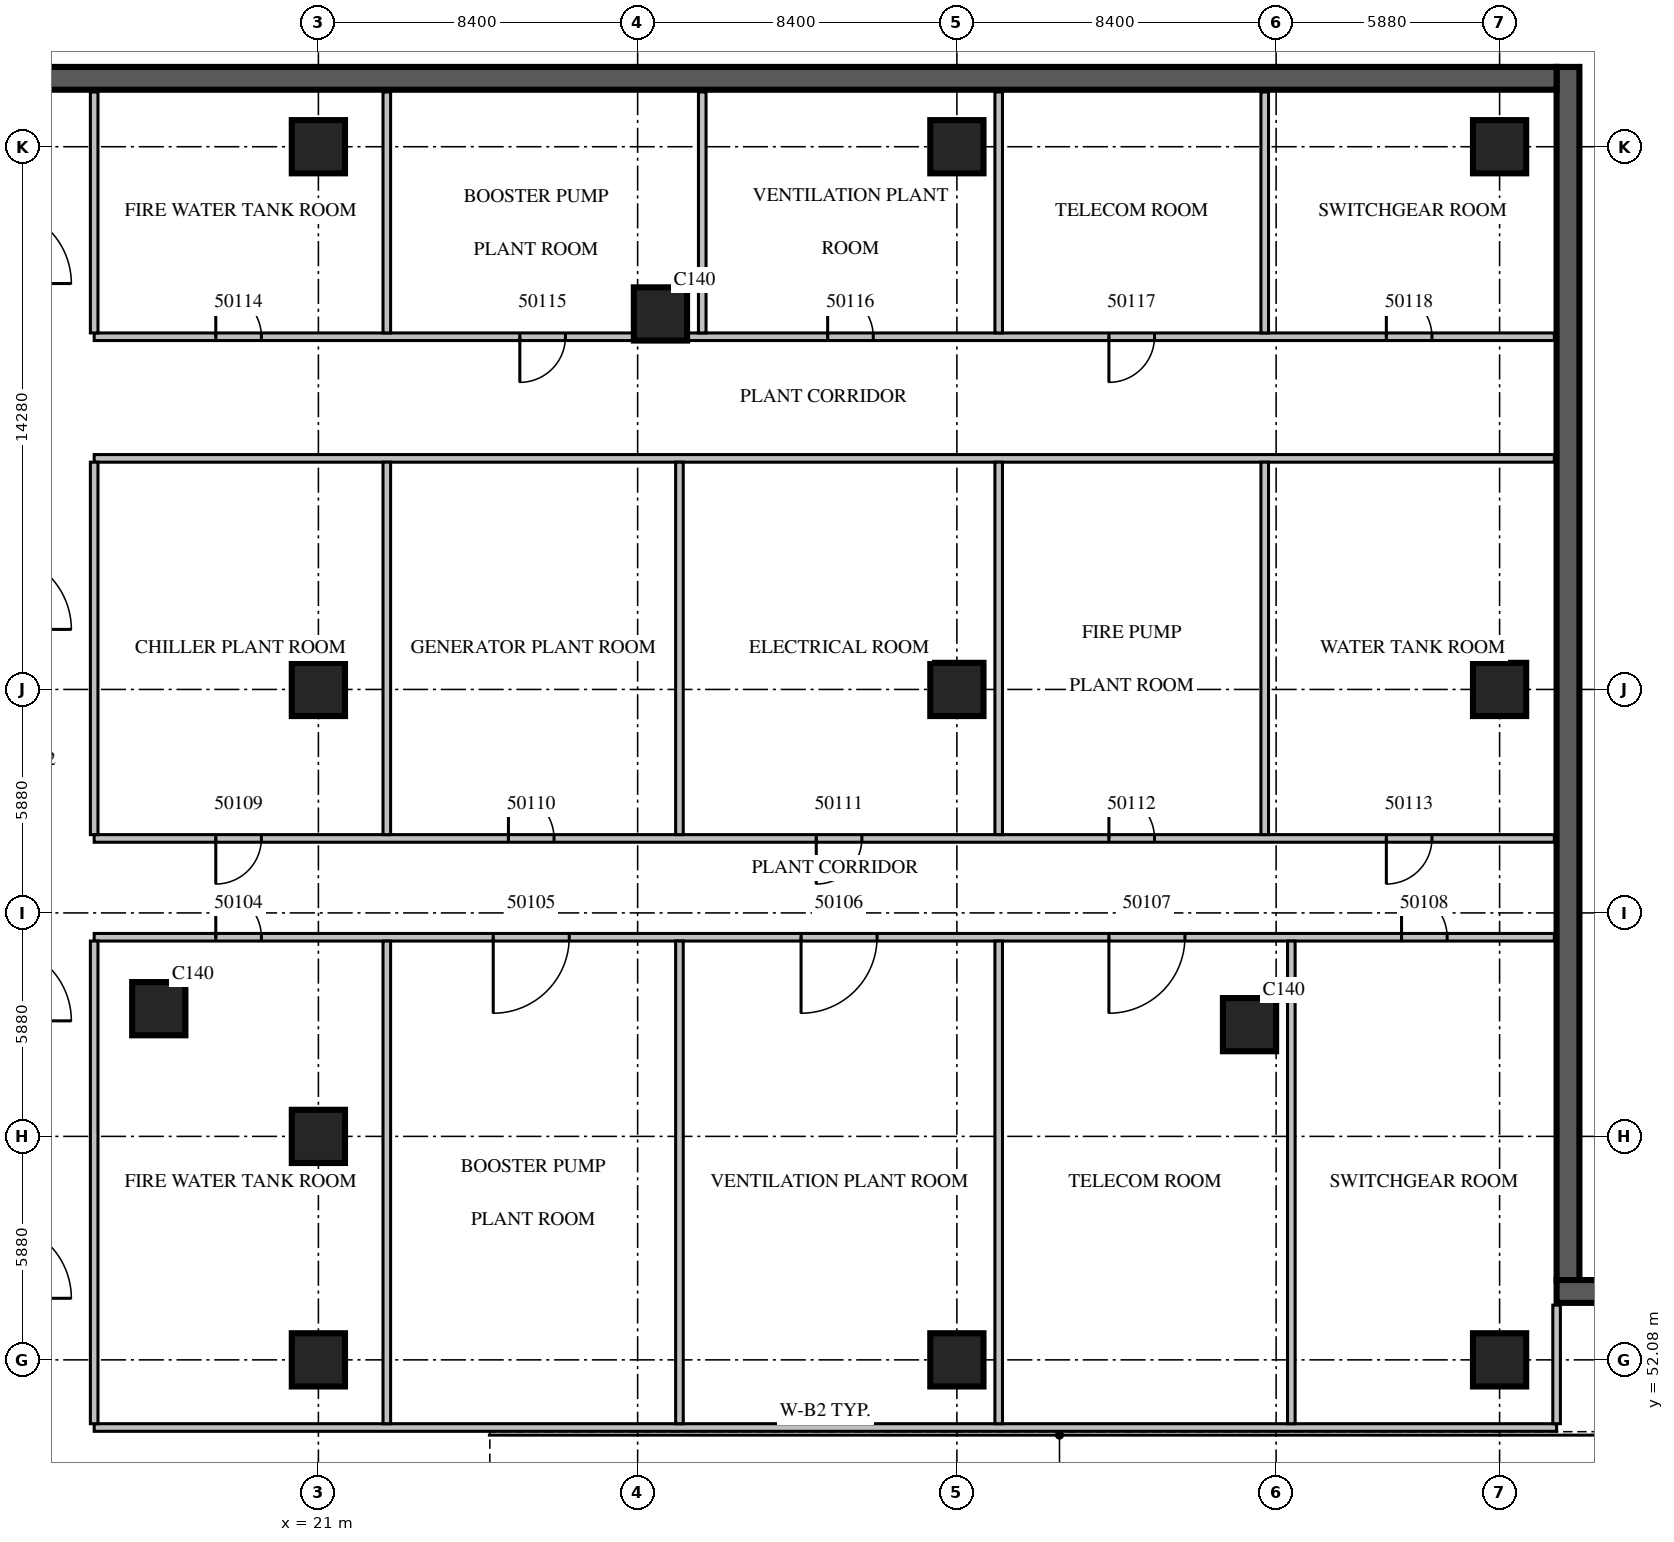
"""IFC4 building model, lengths in metres.
Left out: names, types, materials, properties, quantities, classifications, styles, units other than length and angle.
Written with IfcOpenShell. Run it as: python <this file> out.ifc"""

import sys

from ifc_helpers import new_model, si_unit, direction, frame, frame_2d, origin, origin_2d, place, context, subcontext, project, spatial, rectangle, extrude, source, transform, mapped, element, fill, save


model = new_model("IFC4")
c1 = context("Model", 3, precision=1e-05, world=origin(), true_north=direction((0.0, 1.0)))
c2 = subcontext(c1, "Body", "Model", "MODEL_VIEW")
j1 = project(units=[si_unit("LENGTHUNIT", "METRE"), si_unit("PLANEANGLEUNIT", "RADIAN")], contexts=[c1])
p1 = place(None, origin())
s1 = spatial("IfcSite", under=j1, at=p1, CompositionType="ELEMENT")
p2 = place(p1, origin())
s2 = spatial("IfcBuilding", under=s1, at=p2, CompositionType="ELEMENT")
p3 = place(p2, frame((0.0, 0.0, -9.0)))
s3 = spatial("IfcBuildingStorey", under=s2, at=p3, CompositionType="ELEMENT", Elevation=-9.0)
m1 = source(origin(), c2, "Body", "SweptSolid", [
    extrude(rectangle(XDim=31.92, YDim=0.6, at=frame_2d((15.96, 0.0))), origin(), (0.0, 0.0, 1.0), 4.5),
])
p4 = place(p3, frame((53.88, 54.18, 0.0), z_axis=(0.0, 0.0, 1.0), x_axis=(0.0, 1.0, 0.0)))
e1 = element("IfcWall", 1, at=p4, inside=s3, PredefinedType="SOLIDWALL", context=c2, shape_type="MappedRepresentation", body=[
    mapped(m1, transform((0.0, 0.0, 0.0), scale=1.0)),
])
m2 = source(origin(), c2, "Body", "SweptSolid", [
    extrude(rectangle(XDim=55.68, YDim=0.6, at=frame_2d((27.84, 0.0))), origin(), (0.0, 0.0, 1.0), 4.5),
])
p5 = place(p3, frame((53.58, 85.8, 0.0), z_axis=(0.0, 0.0, 1.0), x_axis=(-1.0, 0.0, 0.0)))
e2 = element("IfcWall", 2, at=p5, inside=s3, PredefinedType="SOLIDWALL", context=c2, shape_type="MappedRepresentation", body=[
    mapped(m2, transform((0.0, 0.0, 0.0), scale=1.0)),
])
p6 = place(p3, frame((85.5, 53.88, 0.0), z_axis=(0.0, 0.0, 1.0), x_axis=(-1.0, 0.0, 0.0)))
e3 = element("IfcWall", 3, at=p6, inside=s3, PredefinedType="SOLIDWALL", context=c2, shape_type="MappedRepresentation", body=[
    mapped(m1, transform((0.0, 0.0, 0.0), scale=1.0)),
])
m3 = source(origin(), c2, "Body", "SweptSolid", [
    extrude(rectangle(XDim=1.4, YDim=1.4, at=origin_2d()), origin(), (0.0, 0.0, 1.0), 4.5),
])
for number, where, z_axis, x_axis in (
    (4, (16.8, 61.32, 0.0), (0.0, 0.0, 1.0), (1.0, 0.0, 0.0)),
    (5, (21.0, 52.08, 0.0), (0.0, 0.0, 1.0), (1.0, 0.0, 0.0)),
    (6, (21.0, 57.96, 0.0), (0.0, 0.0, 1.0), (1.0, 0.0, 0.0)),
    (7, (21.0, 69.72, 0.0), (0.0, 0.0, 1.0), (1.0, 0.0, 0.0)),
    (8, (21.0, 84.0, 0.0), (0.0, 0.0, 1.0), (1.0, 0.0, 0.0)),
    (9, (30.0, 79.6, 0.0), (0.0, 0.0, 1.0), (1.0, 0.0, 0.0)),
    (10, (37.8, 52.08, 0.0), (0.0, 0.0, 1.0), (1.0, 0.0, 0.0)),
    (11, (37.8, 69.72, 0.0), (0.0, 0.0, 1.0), (1.0, 0.0, 0.0)),
    (12, (37.8, 84.0, 0.0), (0.0, 0.0, 1.0), (1.0, 0.0, 0.0)),
    (13, (45.5, 60.9, 0.0), (0.0, 0.0, 1.0), (1.0, 0.0, 0.0)),
    (14, (52.08, 52.08, 0.0), (0.0, 0.0, 1.0), (1.0, 0.0, 0.0)),
    (15, (52.08, 69.72, 0.0), (0.0, 0.0, 1.0), (1.0, 0.0, 0.0)),
    (16, (52.08, 84.0, 0.0), (0.0, 0.0, 1.0), (1.0, 0.0, 0.0)),
):
    element("IfcColumn", number, at=place(p3, frame(where, z_axis=z_axis, x_axis=x_axis)), inside=s3, PredefinedType="COLUMN", context=c2, shape_type="MappedRepresentation", body=[
        mapped(m3, transform((0.0, 0.0, 0.0), scale=1.0)),
    ])
m4 = source(origin(), c2, "Body", "SweptSolid", [
    extrude(rectangle(XDim=38.48, YDim=0.2, at=frame_2d((19.24, 0.0))), origin(), (0.0, 0.0, 1.0), 3.9),
])
p7 = place(p3, frame((15.1, 50.3, 0.0), z_axis=(0.0, 0.0, 1.0), x_axis=(1.0, 0.0, 0.0)))
e17 = element("IfcWall", 17, at=p7, inside=s3, PredefinedType="PARTITIONING", context=c2, shape_type="MappedRepresentation", body=[
    mapped(m4, transform((0.0, 0.0, 0.0), scale=1.0)),
])
m5 = source(origin(), c2, "Body", "SweptSolid", [
    extrude(rectangle(XDim=38.42, YDim=0.2, at=frame_2d((19.21, 0.0))), origin(), (0.0, 0.0, 1.0), 3.9),
])
p8 = place(p3, frame((15.1, 63.2, 0.0), z_axis=(0.0, 0.0, 1.0), x_axis=(1.0, 0.0, 0.0)))
e18 = element("IfcWall", 18, at=p8, inside=s3, PredefinedType="PARTITIONING", context=c2, shape_type="MappedRepresentation", body=[
    mapped(m5, transform((0.0, 0.0, 0.0), scale=1.0)),
])
m6 = source(origin(), c2, "Body", "SweptSolid", [
    extrude(rectangle(XDim=1.2, YDim=2.1, at=frame_2d((0.6, 1.05))), frame((0.0, 0.11, 0.0), z_axis=(0.0, -1.0, 0.0), x_axis=(1.0, 0.0, 0.0)), (0.0, 0.0, 1.0), 0.22),
])
p9 = place(p8, frame((3.2, 0.0, 0.0)))
e19 = element("IfcOpeningElement", 19, at=p9, cuts=e18, PredefinedType="OPENING", context=c2, shape_type="MappedRepresentation", body=[
    mapped(m6, transform((0.0, 0.0, 0.0), scale=1.0)),
])
m7 = source(origin(), c2, "Body", "SweptSolid", [
    extrude(rectangle(XDim=2.0, YDim=2.1, at=frame_2d((1.0, 1.05))), frame((0.0, 0.11, 0.0), z_axis=(0.0, -1.0, 0.0), x_axis=(1.0, 0.0, 0.0)), (0.0, 0.0, 1.0), 0.22),
])
p10 = place(p8, frame((10.5, 0.0, 0.0)))
e20 = element("IfcOpeningElement", 20, at=p10, cuts=e18, PredefinedType="OPENING", context=c2, shape_type="MappedRepresentation", body=[
    mapped(m7, transform((0.0, 0.0, 0.0), scale=1.0)),
])
p11 = place(p8, frame((18.6, 0.0, 0.0)))
e21 = element("IfcOpeningElement", 21, at=p11, cuts=e18, PredefinedType="OPENING", context=c2, shape_type="MappedRepresentation", body=[
    mapped(m7, transform((0.0, 0.0, 0.0), scale=1.0)),
])
p12 = place(p8, frame((26.7, 0.0, 0.0)))
e22 = element("IfcOpeningElement", 22, at=p12, cuts=e18, PredefinedType="OPENING", context=c2, shape_type="MappedRepresentation", body=[
    mapped(m7, transform((0.0, 0.0, 0.0), scale=1.0)),
])
p13 = place(p8, frame((34.4, 0.0, 0.0)))
e23 = element("IfcOpeningElement", 23, at=p13, cuts=e18, PredefinedType="OPENING", context=c2, shape_type="MappedRepresentation", body=[
    mapped(m6, transform((0.0, 0.0, 0.0), scale=1.0)),
])
p14 = place(p3, frame((15.1, 65.8, 0.0), z_axis=(0.0, 0.0, 1.0), x_axis=(1.0, 0.0, 0.0)))
e24 = element("IfcWall", 24, at=p14, inside=s3, PredefinedType="PARTITIONING", context=c2, shape_type="MappedRepresentation", body=[
    mapped(m5, transform((0.0, 0.0, 0.0), scale=1.0)),
])
p15 = place(p14, frame((3.2, 0.0, 0.0)))
e25 = element("IfcOpeningElement", 25, at=p15, cuts=e24, PredefinedType="OPENING", context=c2, shape_type="MappedRepresentation", body=[
    mapped(m6, transform((0.0, 0.0, 0.0), scale=1.0)),
])
p16 = place(p14, frame((10.9, 0.0, 0.0)))
e26 = element("IfcOpeningElement", 26, at=p16, cuts=e24, PredefinedType="OPENING", context=c2, shape_type="MappedRepresentation", body=[
    mapped(m6, transform((0.0, 0.0, 0.0), scale=1.0)),
])
p17 = place(p14, frame((19.0, 0.0, 0.0)))
e27 = element("IfcOpeningElement", 27, at=p17, cuts=e24, PredefinedType="OPENING", context=c2, shape_type="MappedRepresentation", body=[
    mapped(m6, transform((0.0, 0.0, 0.0), scale=1.0)),
])
p18 = place(p14, frame((26.7, 0.0, 0.0)))
e28 = element("IfcOpeningElement", 28, at=p18, cuts=e24, PredefinedType="OPENING", context=c2, shape_type="MappedRepresentation", body=[
    mapped(m6, transform((0.0, 0.0, 0.0), scale=1.0)),
])
p19 = place(p14, frame((34.0, 0.0, 0.0)))
e29 = element("IfcOpeningElement", 29, at=p19, cuts=e24, PredefinedType="OPENING", context=c2, shape_type="MappedRepresentation", body=[
    mapped(m6, transform((0.0, 0.0, 0.0), scale=1.0)),
])
p20 = place(p3, frame((15.1, 75.8, 0.0), z_axis=(0.0, 0.0, 1.0), x_axis=(1.0, 0.0, 0.0)))
e30 = element("IfcWall", 30, at=p20, inside=s3, PredefinedType="PARTITIONING", context=c2, shape_type="MappedRepresentation", body=[
    mapped(m5, transform((0.0, 0.0, 0.0), scale=1.0)),
])
p21 = place(p3, frame((15.1, 79.0, 0.0), z_axis=(0.0, 0.0, 1.0), x_axis=(1.0, 0.0, 0.0)))
e31 = element("IfcWall", 31, at=p21, inside=s3, PredefinedType="PARTITIONING", context=c2, shape_type="MappedRepresentation", body=[
    mapped(m5, transform((0.0, 0.0, 0.0), scale=1.0)),
])
p22 = place(p21, frame((3.2, 0.0, 0.0)))
e32 = element("IfcOpeningElement", 32, at=p22, cuts=e31, PredefinedType="OPENING", context=c2, shape_type="MappedRepresentation", body=[
    mapped(m6, transform((0.0, 0.0, 0.0), scale=1.0)),
])
p23 = place(p21, frame((11.2, 0.0, 0.0)))
e33 = element("IfcOpeningElement", 33, at=p23, cuts=e31, PredefinedType="OPENING", context=c2, shape_type="MappedRepresentation", body=[
    mapped(m6, transform((0.0, 0.0, 0.0), scale=1.0)),
])
p24 = place(p21, frame((19.3, 0.0, 0.0)))
e34 = element("IfcOpeningElement", 34, at=p24, cuts=e31, PredefinedType="OPENING", context=c2, shape_type="MappedRepresentation", body=[
    mapped(m6, transform((0.0, 0.0, 0.0), scale=1.0)),
])
p25 = place(p21, frame((26.7, 0.0, 0.0)))
e35 = element("IfcOpeningElement", 35, at=p25, cuts=e31, PredefinedType="OPENING", context=c2, shape_type="MappedRepresentation", body=[
    mapped(m6, transform((0.0, 0.0, 0.0), scale=1.0)),
])
p26 = place(p21, frame((34.0, 0.0, 0.0)))
e36 = element("IfcOpeningElement", 36, at=p26, cuts=e31, PredefinedType="OPENING", context=c2, shape_type="MappedRepresentation", body=[
    mapped(m6, transform((0.0, 0.0, 0.0), scale=1.0)),
])
m8 = source(origin(), c2, "Body", "SweptSolid", [
    extrude(rectangle(XDim=12.7, YDim=0.2, at=frame_2d((6.35, 0.0))), origin(), (0.0, 0.0, 1.0), 3.9),
])
p27 = place(p3, frame((15.1, 50.4, 0.0), z_axis=(0.0, 0.0, 1.0), x_axis=(0.0, 1.0, 0.0)))
e37 = element("IfcWall", 37, at=p27, inside=s3, PredefinedType="PARTITIONING", context=c2, shape_type="MappedRepresentation", body=[
    mapped(m8, transform((0.0, 0.0, 0.0), scale=1.0)),
])
m9 = source(origin(), c2, "Body", "SweptSolid", [
    extrude(rectangle(XDim=9.8, YDim=0.2, at=frame_2d((4.9, 0.0))), origin(), (0.0, 0.0, 1.0), 3.9),
])
p28 = place(p3, frame((15.1, 65.9, 0.0), z_axis=(0.0, 0.0, 1.0), x_axis=(0.0, 1.0, 0.0)))
e38 = element("IfcWall", 38, at=p28, inside=s3, PredefinedType="PARTITIONING", context=c2, shape_type="MappedRepresentation", body=[
    mapped(m9, transform((0.0, 0.0, 0.0), scale=1.0)),
])
m10 = source(origin(), c2, "Body", "SweptSolid", [
    extrude(rectangle(XDim=6.34, YDim=0.2, at=frame_2d((3.17, 0.0))), origin(), (0.0, 0.0, 1.0), 3.9),
])
p29 = place(p3, frame((15.1, 79.1, 0.0), z_axis=(0.0, 0.0, 1.0), x_axis=(0.0, 1.0, 0.0)))
e39 = element("IfcWall", 39, at=p29, inside=s3, PredefinedType="PARTITIONING", context=c2, shape_type="MappedRepresentation", body=[
    mapped(m10, transform((0.0, 0.0, 0.0), scale=1.0)),
])
p30 = place(p3, frame((22.8, 50.4, 0.0), z_axis=(0.0, 0.0, 1.0), x_axis=(0.0, 1.0, 0.0)))
e40 = element("IfcWall", 40, at=p30, inside=s3, PredefinedType="PARTITIONING", context=c2, shape_type="MappedRepresentation", body=[
    mapped(m8, transform((0.0, 0.0, 0.0), scale=1.0)),
])
p31 = place(p3, frame((22.8, 65.9, 0.0), z_axis=(0.0, 0.0, 1.0), x_axis=(0.0, 1.0, 0.0)))
e41 = element("IfcWall", 41, at=p31, inside=s3, PredefinedType="PARTITIONING", context=c2, shape_type="MappedRepresentation", body=[
    mapped(m9, transform((0.0, 0.0, 0.0), scale=1.0)),
])
p32 = place(p3, frame((22.8, 79.1, 0.0), z_axis=(0.0, 0.0, 1.0), x_axis=(0.0, 1.0, 0.0)))
e42 = element("IfcWall", 42, at=p32, inside=s3, PredefinedType="PARTITIONING", context=c2, shape_type="MappedRepresentation", body=[
    mapped(m10, transform((0.0, 0.0, 0.0), scale=1.0)),
])
p33 = place(p3, frame((30.5, 50.4, 0.0), z_axis=(0.0, 0.0, 1.0), x_axis=(0.0, 1.0, 0.0)))
e43 = element("IfcWall", 43, at=p33, inside=s3, PredefinedType="PARTITIONING", context=c2, shape_type="MappedRepresentation", body=[
    mapped(m8, transform((0.0, 0.0, 0.0), scale=1.0)),
])
p34 = place(p3, frame((30.5, 65.9, 0.0), z_axis=(0.0, 0.0, 1.0), x_axis=(0.0, 1.0, 0.0)))
e44 = element("IfcWall", 44, at=p34, inside=s3, PredefinedType="PARTITIONING", context=c2, shape_type="MappedRepresentation", body=[
    mapped(m9, transform((0.0, 0.0, 0.0), scale=1.0)),
])
p35 = place(p3, frame((31.1, 79.1, 0.0), z_axis=(0.0, 0.0, 1.0), x_axis=(0.0, 1.0, 0.0)))
e45 = element("IfcWall", 45, at=p35, inside=s3, PredefinedType="PARTITIONING", context=c2, shape_type="MappedRepresentation", body=[
    mapped(m10, transform((0.0, 0.0, 0.0), scale=1.0)),
])
p36 = place(p3, frame((38.9, 50.4, 0.0), z_axis=(0.0, 0.0, 1.0), x_axis=(0.0, 1.0, 0.0)))
e46 = element("IfcWall", 46, at=p36, inside=s3, PredefinedType="PARTITIONING", context=c2, shape_type="MappedRepresentation", body=[
    mapped(m8, transform((0.0, 0.0, 0.0), scale=1.0)),
])
p37 = place(p3, frame((38.9, 65.9, 0.0), z_axis=(0.0, 0.0, 1.0), x_axis=(0.0, 1.0, 0.0)))
e47 = element("IfcWall", 47, at=p37, inside=s3, PredefinedType="PARTITIONING", context=c2, shape_type="MappedRepresentation", body=[
    mapped(m9, transform((0.0, 0.0, 0.0), scale=1.0)),
])
p38 = place(p3, frame((38.9, 79.1, 0.0), z_axis=(0.0, 0.0, 1.0), x_axis=(0.0, 1.0, 0.0)))
e48 = element("IfcWall", 48, at=p38, inside=s3, PredefinedType="PARTITIONING", context=c2, shape_type="MappedRepresentation", body=[
    mapped(m10, transform((0.0, 0.0, 0.0), scale=1.0)),
])
p39 = place(p3, frame((45.9, 65.9, 0.0), z_axis=(0.0, 0.0, 1.0), x_axis=(0.0, 1.0, 0.0)))
e49 = element("IfcWall", 49, at=p39, inside=s3, PredefinedType="PARTITIONING", context=c2, shape_type="MappedRepresentation", body=[
    mapped(m9, transform((0.0, 0.0, 0.0), scale=1.0)),
])
p40 = place(p3, frame((45.9, 79.1, 0.0), z_axis=(0.0, 0.0, 1.0), x_axis=(0.0, 1.0, 0.0)))
e50 = element("IfcWall", 50, at=p40, inside=s3, PredefinedType="PARTITIONING", context=c2, shape_type="MappedRepresentation", body=[
    mapped(m10, transform((0.0, 0.0, 0.0), scale=1.0)),
])
p41 = place(p3, frame((46.6, 50.4, 0.0), z_axis=(0.0, 0.0, 1.0), x_axis=(0.0, 1.0, 0.0)))
e51 = element("IfcWall", 51, at=p41, inside=s3, PredefinedType="PARTITIONING", context=c2, shape_type="MappedRepresentation", body=[
    mapped(m8, transform((0.0, 0.0, 0.0), scale=1.0)),
])
m11 = source(origin(), c2, "Body", "SweptSolid", [
    extrude(rectangle(XDim=3.12, YDim=0.2, at=frame_2d((1.56, 0.0))), origin(), (0.0, 0.0, 1.0), 3.9),
])
p42 = place(p3, frame((53.58, 50.4, 0.0), z_axis=(0.0, 0.0, 1.0), x_axis=(0.0, 1.0, 0.0)))
e52 = element("IfcWall", 52, at=p42, inside=s3, PredefinedType="PARTITIONING", context=c2, shape_type="MappedRepresentation", body=[
    mapped(m11, transform((0.0, 0.0, 0.0), scale=1.0)),
])
m12 = source(origin(), c2, "Body", "SweptSolid", [
    extrude(rectangle(XDim=1.2, YDim=2.1, at=frame_2d((0.6, 1.05))), frame((0.0, 0.025, 0.0), z_axis=(0.0, -1.0, 0.0), x_axis=(1.0, 0.0, 0.0)), (0.0, 0.0, 1.0), 0.05),
])
p43 = place(p9, origin())
e53 = element("IfcDoor", 53, at=p43, inside=s3, OperationType="SINGLE_SWING_LEFT", PredefinedType="DOOR", context=c2, shape_type="MappedRepresentation", body=[
    mapped(m12, transform((0.0, 0.0, 0.0), scale=1.0)),
])
fill(e19, e53)
m13 = source(origin(), c2, "Body", "SweptSolid", [
    extrude(rectangle(XDim=2.0, YDim=2.1, at=frame_2d((1.0, 1.05))), frame((0.0, 0.025, 0.0), z_axis=(0.0, -1.0, 0.0), x_axis=(1.0, 0.0, 0.0)), (0.0, 0.0, 1.0), 0.05),
])
p44 = place(p10, origin())
e54 = element("IfcDoor", 54, at=p44, inside=s3, OperationType="DOUBLE_DOOR_SINGLE_SWING", PredefinedType="DOOR", context=c2, shape_type="MappedRepresentation", body=[
    mapped(m13, transform((0.0, 0.0, 0.0), scale=1.0)),
])
fill(e20, e54)
p45 = place(p11, origin())
e55 = element("IfcDoor", 55, at=p45, inside=s3, OperationType="DOUBLE_DOOR_SINGLE_SWING", PredefinedType="DOOR", context=c2, shape_type="MappedRepresentation", body=[
    mapped(m13, transform((0.0, 0.0, 0.0), scale=1.0)),
])
fill(e21, e55)
p46 = place(p12, origin())
e56 = element("IfcDoor", 56, at=p46, inside=s3, OperationType="DOUBLE_DOOR_SINGLE_SWING", PredefinedType="DOOR", context=c2, shape_type="MappedRepresentation", body=[
    mapped(m13, transform((0.0, 0.0, 0.0), scale=1.0)),
])
fill(e22, e56)
p47 = place(p13, origin())
e57 = element("IfcDoor", 57, at=p47, inside=s3, OperationType="SINGLE_SWING_LEFT", PredefinedType="DOOR", context=c2, shape_type="MappedRepresentation", body=[
    mapped(m12, transform((0.0, 0.0, 0.0), scale=1.0)),
])
fill(e23, e57)
p48 = place(p15, origin())
e58 = element("IfcDoor", 58, at=p48, inside=s3, OperationType="SINGLE_SWING_RIGHT", PredefinedType="DOOR", context=c2, shape_type="MappedRepresentation", body=[
    mapped(m12, transform((0.0, 0.0, 0.0), scale=1.0)),
])
fill(e25, e58)
p49 = place(p16, origin())
e59 = element("IfcDoor", 59, at=p49, inside=s3, OperationType="SINGLE_SWING_LEFT", PredefinedType="DOOR", context=c2, shape_type="MappedRepresentation", body=[
    mapped(m12, transform((0.0, 0.0, 0.0), scale=1.0)),
])
fill(e26, e59)
p50 = place(p17, origin())
e60 = element("IfcDoor", 60, at=p50, inside=s3, OperationType="SINGLE_SWING_RIGHT", PredefinedType="DOOR", context=c2, shape_type="MappedRepresentation", body=[
    mapped(m12, transform((0.0, 0.0, 0.0), scale=1.0)),
])
fill(e27, e60)
p51 = place(p18, origin())
e61 = element("IfcDoor", 61, at=p51, inside=s3, OperationType="SINGLE_SWING_LEFT", PredefinedType="DOOR", context=c2, shape_type="MappedRepresentation", body=[
    mapped(m12, transform((0.0, 0.0, 0.0), scale=1.0)),
])
fill(e28, e61)
p52 = place(p19, origin())
e62 = element("IfcDoor", 62, at=p52, inside=s3, OperationType="SINGLE_SWING_RIGHT", PredefinedType="DOOR", context=c2, shape_type="MappedRepresentation", body=[
    mapped(m12, transform((0.0, 0.0, 0.0), scale=1.0)),
])
fill(e29, e62)
p53 = place(p22, origin())
e63 = element("IfcDoor", 63, at=p53, inside=s3, OperationType="SINGLE_SWING_LEFT", PredefinedType="DOOR", context=c2, shape_type="MappedRepresentation", body=[
    mapped(m12, transform((0.0, 0.0, 0.0), scale=1.0)),
])
fill(e32, e63)
p54 = place(p23, origin())
e64 = element("IfcDoor", 64, at=p54, inside=s3, OperationType="SINGLE_SWING_RIGHT", PredefinedType="DOOR", context=c2, shape_type="MappedRepresentation", body=[
    mapped(m12, transform((0.0, 0.0, 0.0), scale=1.0)),
])
fill(e33, e64)
p55 = place(p24, origin())
e65 = element("IfcDoor", 65, at=p55, inside=s3, OperationType="SINGLE_SWING_LEFT", PredefinedType="DOOR", context=c2, shape_type="MappedRepresentation", body=[
    mapped(m12, transform((0.0, 0.0, 0.0), scale=1.0)),
])
fill(e34, e65)
p56 = place(p25, origin())
e66 = element("IfcDoor", 66, at=p56, inside=s3, OperationType="SINGLE_SWING_RIGHT", PredefinedType="DOOR", context=c2, shape_type="MappedRepresentation", body=[
    mapped(m12, transform((0.0, 0.0, 0.0), scale=1.0)),
])
fill(e35, e66)
p57 = place(p26, origin())
e67 = element("IfcDoor", 67, at=p57, inside=s3, OperationType="SINGLE_SWING_LEFT", PredefinedType="DOOR", context=c2, shape_type="MappedRepresentation", body=[
    mapped(m12, transform((0.0, 0.0, 0.0), scale=1.0)),
])
fill(e36, e67)
save(model, sys.argv[1])
